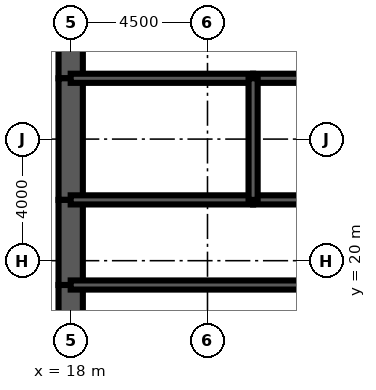
"""IFC4 building model, lengths in metres.
Left out: names, types, materials, properties, quantities, classifications, styles, units other than length and angle.
Written with IfcOpenShell. Run it as: python <this file> out.ifc"""

import sys

from ifc_helpers import new_model, si_unit, direction, frame, frame_2d, origin, place, context, subcontext, project, spatial, rectangle, extrude, element, fill, save


model = new_model("IFC4")
c1 = context("Model", 3, precision=1e-05, world=origin(), true_north=direction((0.0, 1.0)))
c2 = subcontext(c1, "Body", "Model", "MODEL_VIEW")
j1 = project(units=[si_unit("LENGTHUNIT", "METRE"), si_unit("PLANEANGLEUNIT", "RADIAN")], contexts=[c1])
p1 = place(None, origin())
s1 = spatial("IfcSite", under=j1, at=p1, CompositionType="ELEMENT")
p2 = place(p1, origin())
s2 = spatial("IfcBuilding", under=s1, at=p2, CompositionType="ELEMENT")
p3 = place(p2, frame((0.0, 0.0, 236.2)))
s3 = spatial("IfcBuildingStorey", under=s2, at=p3, CompositionType="ELEMENT", Elevation=236.2)
p4 = place(p3, frame((18.0, 28.8, 0.0), z_axis=(0.0, 0.0, 1.0), x_axis=(0.0, -1.0, 0.0)))
e1 = element("IfcWall", 1, at=p4, inside=s3, PredefinedType="SHEAR", context=c2, shape_type="SweptSolid", body=[
    extrude(rectangle(XDim=2.8, YDim=0.8, at=frame_2d((1.4, 0.0))), origin(), (0.0, 0.0, 1.0), 4.2),
])
p5 = place(p4, frame((0.4, 0.0, 0.0)))
e2 = element("IfcOpeningElement", 2, at=p5, cuts=e1, PredefinedType="OPENING", context=c2, shape_type="SweptSolid", body=[
    extrude(rectangle(XDim=1.8, YDim=2.1, at=frame_2d((0.9, 1.05))), frame((0.0, 0.41, 0.0), z_axis=(0.0, -1.0, 0.0), x_axis=(1.0, 0.0, 0.0)), (0.0, 0.0, 1.0), 0.82),
])
p6 = place(p3, frame((18.0, 26.0, 0.0), z_axis=(0.0, 0.0, 1.0), x_axis=(0.0, -1.0, 0.0)))
e3 = element("IfcWall", 3, at=p6, inside=s3, PredefinedType="SHEAR", context=c2, shape_type="SweptSolid", body=[
    extrude(rectangle(XDim=4.0, YDim=0.8, at=frame_2d((2.0, 0.0))), origin(), (0.0, 0.0, 1.0), 4.2),
])
p7 = place(p3, frame((18.0, 22.0, 0.0), z_axis=(0.0, 0.0, 1.0), x_axis=(0.0, -1.0, 0.0)))
e4 = element("IfcWall", 4, at=p7, inside=s3, PredefinedType="SHEAR", context=c2, shape_type="SweptSolid", body=[
    extrude(rectangle(XDim=2.8, YDim=0.8, at=frame_2d((1.4, 0.0))), origin(), (0.0, 0.0, 1.0), 4.2),
])
p8 = place(p7, frame((0.6, 0.0, 0.0)))
e5 = element("IfcOpeningElement", 5, at=p8, cuts=e4, PredefinedType="OPENING", context=c2, shape_type="SweptSolid", body=[
    extrude(rectangle(XDim=1.8, YDim=2.1, at=frame_2d((0.9, 1.05))), frame((0.0, 0.41, 0.0), z_axis=(0.0, -1.0, 0.0), x_axis=(1.0, 0.0, 0.0)), (0.0, 0.0, 1.0), 0.82),
])
p9 = place(p3, frame((18.0, 19.2, 0.0), z_axis=(0.0, 0.0, 1.0), x_axis=(0.0, -1.0, 0.0)))
e6 = element("IfcWall", 6, at=p9, inside=s3, PredefinedType="SHEAR", context=c2, shape_type="SweptSolid", body=[
    extrude(rectangle(XDim=3.2, YDim=0.8, at=frame_2d((1.6, 0.0))), origin(), (0.0, 0.0, 1.0), 4.2),
])
p10 = place(p3, frame((18.0, 19.2, 0.0), z_axis=(0.0, 0.0, 1.0), x_axis=(1.0, 0.0, 0.0)))
e7 = element("IfcWall", 7, at=p10, inside=s3, PredefinedType="SOLIDWALL", context=c2, shape_type="SweptSolid", body=[
    extrude(rectangle(XDim=9.0, YDim=0.3, at=frame_2d((4.5, 0.0))), origin(), (0.0, 0.0, 1.0), 4.2),
])
p11 = place(p10, frame((0.65, 0.0, 0.0)))
e8 = element("IfcOpeningElement", 8, at=p11, cuts=e7, PredefinedType="OPENING", context=c2, shape_type="SweptSolid", body=[
    extrude(rectangle(XDim=1.0, YDim=2.1, at=frame_2d((0.5, 1.05))), frame((0.0, 0.16, 0.0), z_axis=(0.0, -1.0, 0.0), x_axis=(1.0, 0.0, 0.0)), (0.0, 0.0, 1.0), 0.32),
])
p12 = place(p3, frame((18.0, 22.0, 0.0), z_axis=(0.0, 0.0, 1.0), x_axis=(1.0, 0.0, 0.0)))
e9 = element("IfcWall", 9, at=p12, inside=s3, PredefinedType="SOLIDWALL", context=c2, shape_type="SweptSolid", body=[
    extrude(rectangle(XDim=6.0, YDim=0.3, at=frame_2d((3.0, 0.0))), origin(), (0.0, 0.0, 1.0), 4.2),
])
p13 = place(p12, frame((4.4, 0.0, 0.0)))
e10 = element("IfcOpeningElement", 10, at=p13, cuts=e9, PredefinedType="OPENING", context=c2, shape_type="SweptSolid", body=[
    extrude(rectangle(XDim=1.0, YDim=2.1, at=frame_2d((0.5, 1.05))), frame((0.0, 0.16, 0.0), z_axis=(0.0, -1.0, 0.0), x_axis=(1.0, 0.0, 0.0)), (0.0, 0.0, 1.0), 0.32),
])
p14 = place(p12, frame((0.95, 0.0, 0.0)))
e11 = element("IfcOpeningElement", 11, at=p14, cuts=e9, PredefinedType="OPENING", context=c2, shape_type="SweptSolid", body=[
    extrude(rectangle(XDim=1.0, YDim=2.1, at=frame_2d((0.5, 1.05))), frame((0.0, 0.16, 0.0), z_axis=(0.0, -1.0, 0.0), x_axis=(1.0, 0.0, 0.0)), (0.0, 0.0, 1.0), 0.32),
])
p15 = place(p3, frame((24.0, 22.0, 0.0), z_axis=(0.0, 0.0, 1.0), x_axis=(1.0, 0.0, 0.0)))
e12 = element("IfcWall", 12, at=p15, inside=s3, PredefinedType="SOLIDWALL", context=c2, shape_type="SweptSolid", body=[
    extrude(rectangle(XDim=3.0, YDim=0.3, at=frame_2d((1.5, 0.0))), origin(), (0.0, 0.0, 1.0), 4.2),
])
p16 = place(p15, frame((1.0, 0.0, 0.0)))
e13 = element("IfcOpeningElement", 13, at=p16, cuts=e12, PredefinedType="OPENING", context=c2, shape_type="SweptSolid", body=[
    extrude(rectangle(XDim=1.0, YDim=2.1, at=frame_2d((0.5, 1.05))), frame((0.0, 0.16, 0.0), z_axis=(0.0, -1.0, 0.0), x_axis=(1.0, 0.0, 0.0)), (0.0, 0.0, 1.0), 0.32),
])
p17 = place(p3, frame((18.0, 26.0, 0.0), z_axis=(0.0, 0.0, 1.0), x_axis=(1.0, 0.0, 0.0)))
e14 = element("IfcWall", 14, at=p17, inside=s3, PredefinedType="SOLIDWALL", context=c2, shape_type="SweptSolid", body=[
    extrude(rectangle(XDim=6.0, YDim=0.3, at=frame_2d((3.0, 0.0))), origin(), (0.0, 0.0, 1.0), 4.2),
])
p18 = place(p3, frame((24.0, 26.0, 0.0), z_axis=(0.0, 0.0, 1.0), x_axis=(1.0, 0.0, 0.0)))
e15 = element("IfcWall", 15, at=p18, inside=s3, PredefinedType="SOLIDWALL", context=c2, shape_type="SweptSolid", body=[
    extrude(rectangle(XDim=3.0, YDim=0.3, at=frame_2d((1.5, 0.0))), origin(), (0.0, 0.0, 1.0), 4.2),
])
p19 = place(p3, frame((24.0, 22.0, 0.0), z_axis=(0.0, 0.0, 1.0), x_axis=(0.0, 1.0, 0.0)))
e16 = element("IfcWall", 16, at=p19, inside=s3, PredefinedType="SOLIDWALL", context=c2, shape_type="SweptSolid", body=[
    extrude(rectangle(XDim=4.0, YDim=0.3, at=frame_2d((2.0, 0.0))), origin(), (0.0, 0.0, 1.0), 4.2),
])
p20 = place(p3, frame((20.575, 22.15, 0.0), z_axis=(0.0, 0.0, 1.0), x_axis=(0.0, 1.0, 0.0)))
e17 = element("IfcWall", 17, at=p20, inside=s3, PredefinedType="PARTITIONING", context=c2, shape_type="SweptSolid", body=[
    extrude(rectangle(XDim=3.7, YDim=0.15, at=frame_2d((1.85, 0.0))), origin(), (0.0, 0.0, 1.0), 3.0),
])
p21 = place(p3, frame((24.5, 19.35, 0.0), z_axis=(0.0, 0.0, 1.0), x_axis=(0.0, 1.0, 0.0)))
e18 = element("IfcWall", 18, at=p21, inside=s3, PredefinedType="PARTITIONING", context=c2, shape_type="SweptSolid", body=[
    extrude(rectangle(XDim=2.5, YDim=0.15, at=frame_2d((1.25, 0.0))), origin(), (0.0, 0.0, 1.0), 3.0),
])
p22 = place(p21, frame((1.15, 0.0, 0.0)))
e19 = element("IfcOpeningElement", 19, at=p22, cuts=e18, PredefinedType="OPENING", context=c2, shape_type="SweptSolid", body=[
    extrude(rectangle(XDim=1.0, YDim=2.1, at=frame_2d((0.5, 1.05))), frame((0.0, 0.085, 0.0), z_axis=(0.0, -1.0, 0.0), x_axis=(1.0, 0.0, 0.0)), (0.0, 0.0, 1.0), 0.17),
])
p23 = place(p22, origin())
e20 = element("IfcDoor", 20, at=p23, inside=s3, OperationType="SINGLE_SWING_RIGHT", PredefinedType="DOOR", context=c2, shape_type="SweptSolid", body=[
    extrude(rectangle(XDim=1.0, YDim=2.1, at=frame_2d((0.5, 1.05))), frame((0.0, 0.025, 0.0), z_axis=(0.0, -1.0, 0.0), x_axis=(1.0, 0.0, 0.0)), (0.0, 0.0, 1.0), 0.05),
])
fill(e19, e20)
p24 = place(p11, origin())
e21 = element("IfcDoor", 21, at=p24, inside=s3, OperationType="SINGLE_SWING_LEFT", PredefinedType="DOOR", context=c2, shape_type="SweptSolid", body=[
    extrude(rectangle(XDim=1.0, YDim=2.1, at=frame_2d((0.5, 1.05))), frame((0.0, 0.025, 0.0), z_axis=(0.0, -1.0, 0.0), x_axis=(1.0, 0.0, 0.0)), (0.0, 0.0, 1.0), 0.05),
])
fill(e8, e21)
p25 = place(p8, origin())
e22 = element("IfcDoor", 22, at=p25, inside=s3, OperationType="SINGLE_SWING_LEFT", PredefinedType="DOOR", context=c2, shape_type="SweptSolid", body=[
    extrude(rectangle(XDim=1.8, YDim=2.1, at=frame_2d((0.9, 1.05))), frame((0.0, 0.4, 0.0), z_axis=(0.0, -1.0, 0.0), x_axis=(1.0, 0.0, 0.0)), (0.0, 0.0, 1.0), 0.8),
])
fill(e5, e22)
p26 = place(p5, origin())
e23 = element("IfcDoor", 23, at=p26, inside=s3, OperationType="SINGLE_SWING_LEFT", PredefinedType="DOOR", context=c2, shape_type="SweptSolid", body=[
    extrude(rectangle(XDim=1.8, YDim=2.1, at=frame_2d((0.9, 1.05))), frame((0.0, 0.4, 0.0), z_axis=(0.0, -1.0, 0.0), x_axis=(1.0, 0.0, 0.0)), (0.0, 0.0, 1.0), 0.8),
])
fill(e2, e23)
p27 = place(p13, origin())
e24 = element("IfcDoor", 24, at=p27, inside=s3, OperationType="SINGLE_SWING_RIGHT", PredefinedType="DOOR", context=c2, shape_type="SweptSolid", body=[
    extrude(rectangle(XDim=1.0, YDim=2.1, at=frame_2d((0.5, 1.05))), frame((0.0, 0.025, 0.0), z_axis=(0.0, -1.0, 0.0), x_axis=(1.0, 0.0, 0.0)), (0.0, 0.0, 1.0), 0.05),
])
fill(e10, e24)
p28 = place(p16, origin())
e25 = element("IfcDoor", 25, at=p28, inside=s3, OperationType="SINGLE_SWING_LEFT", PredefinedType="DOOR", context=c2, shape_type="SweptSolid", body=[
    extrude(rectangle(XDim=1.0, YDim=2.1, at=frame_2d((0.5, 1.05))), frame((0.0, 0.025, 0.0), z_axis=(0.0, -1.0, 0.0), x_axis=(1.0, 0.0, 0.0)), (0.0, 0.0, 1.0), 0.05),
])
fill(e13, e25)
p29 = place(p14, origin())
e26 = element("IfcDoor", 26, at=p29, inside=s3, OperationType="SINGLE_SWING_LEFT", PredefinedType="DOOR", context=c2, shape_type="SweptSolid", body=[
    extrude(rectangle(XDim=1.0, YDim=2.1, at=frame_2d((0.5, 1.05))), frame((0.0, 0.025, 0.0), z_axis=(0.0, -1.0, 0.0), x_axis=(1.0, 0.0, 0.0)), (0.0, 0.0, 1.0), 0.05),
])
fill(e11, e26)
save(model, sys.argv[1])
